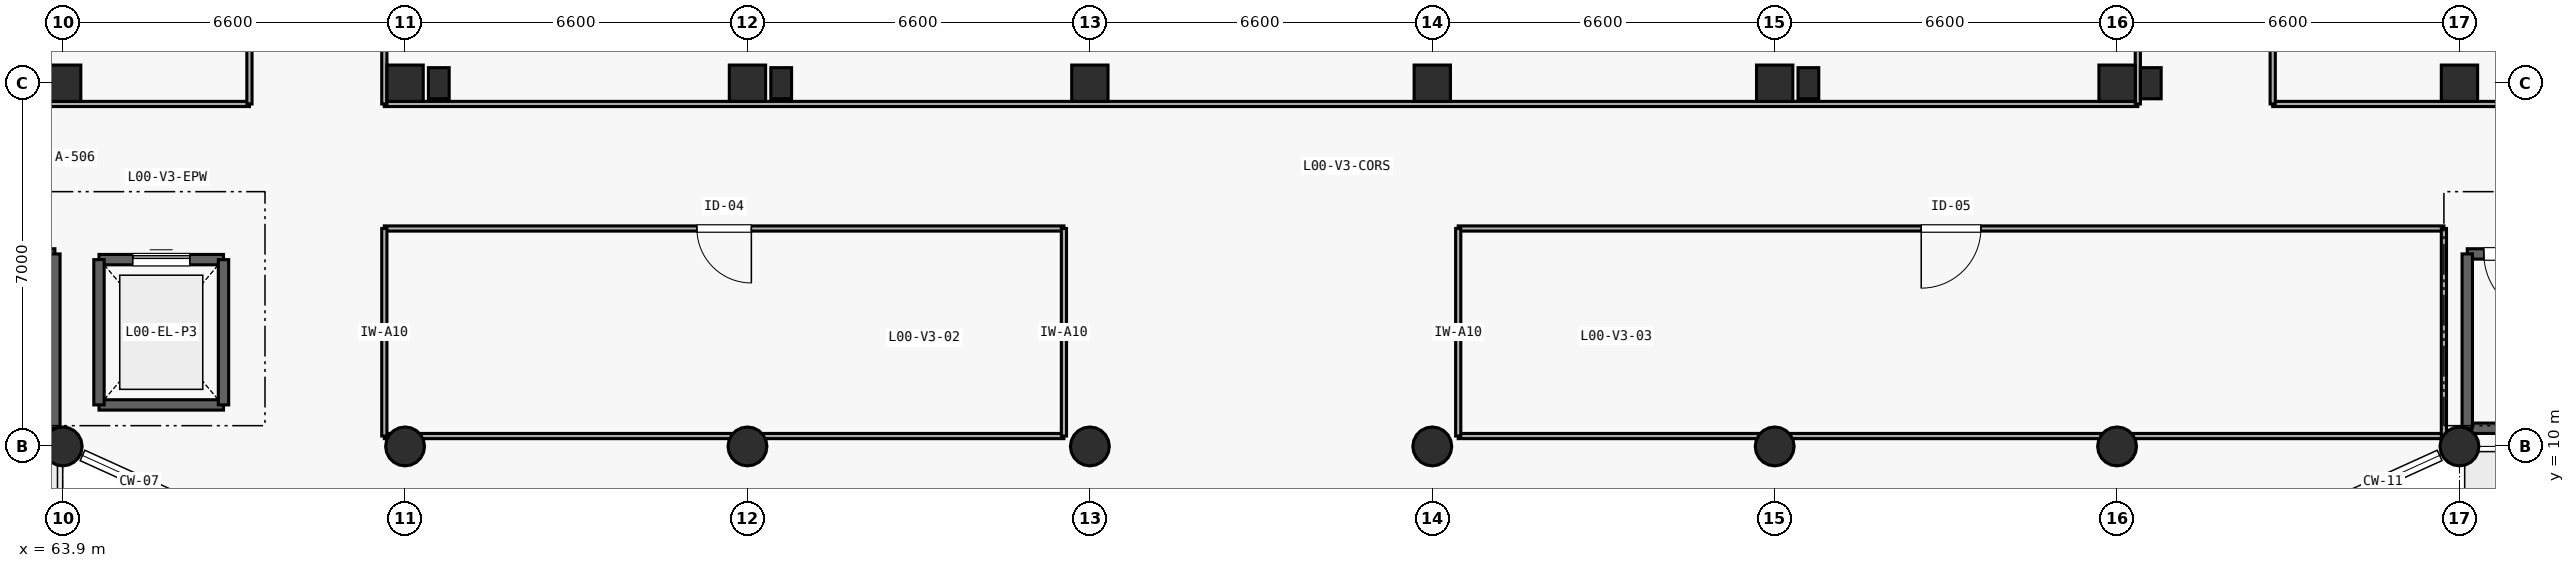
"""IFC4 building model, lengths in metres.
Left out: names, types, materials, properties, quantities, classifications, styles, units other than length and angle.
Written with IfcOpenShell. Run it as: python <this file> out.ifc"""

import sys

from ifc_helpers import new_model, si_unit, direction, frame, frame_2d, origin, origin_2d, place, context, subcontext, project, spatial, rectangle, circle, extrude, element, fill, save


model = new_model("IFC4")
c1 = context("Model", 3, precision=1e-05, world=origin(), true_north=direction((0.0, 1.0)))
c2 = subcontext(c1, "Body", "Model", "MODEL_VIEW")
j1 = project(units=[si_unit("LENGTHUNIT", "METRE"), si_unit("PLANEANGLEUNIT", "RADIAN")], contexts=[c1])
p1 = place(None, origin())
s1 = spatial("IfcSite", under=j1, at=p1, CompositionType="ELEMENT")
p2 = place(p1, origin())
s2 = spatial("IfcBuilding", under=s1, at=p2, CompositionType="ELEMENT")
p3 = place(p2, origin())
s3 = spatial("IfcBuildingStorey", under=s2, at=p3, CompositionType="ELEMENT", Elevation=0.0)
p4 = place(p3, frame((63.9, 10.0, 0.0), z_axis=(0.0, 0.0, 1.0), x_axis=(1.0, 0.0, 0.0)))
e1 = element("IfcColumn", 1, at=p4, inside=s3, PredefinedType="COLUMN", context=c2, shape_type="SweptSolid", body=[
    extrude(circle(Radius=0.375, at=origin_2d()), origin(), (0.0, 0.0, 1.0), 4.2),
])
p5 = place(p3, frame((63.9, 17.0, 0.0), z_axis=(0.0, 0.0, 1.0), x_axis=(1.0, 0.0, 0.0)))
e2 = element("IfcColumn", 2, at=p5, inside=s3, PredefinedType="COLUMN", context=c2, shape_type="SweptSolid", body=[
    extrude(rectangle(XDim=0.7, YDim=0.7, at=origin_2d()), origin(), (0.0, 0.0, 1.0), 4.2),
])
p6 = place(p3, frame((70.5, 10.0, 0.0), z_axis=(0.0, 0.0, 1.0), x_axis=(1.0, 0.0, 0.0)))
e3 = element("IfcColumn", 3, at=p6, inside=s3, PredefinedType="COLUMN", context=c2, shape_type="SweptSolid", body=[
    extrude(circle(Radius=0.375, at=origin_2d()), origin(), (0.0, 0.0, 1.0), 4.2),
])
p7 = place(p3, frame((70.5, 17.0, 0.0), z_axis=(0.0, 0.0, 1.0), x_axis=(1.0, 0.0, 0.0)))
e4 = element("IfcColumn", 4, at=p7, inside=s3, PredefinedType="COLUMN", context=c2, shape_type="SweptSolid", body=[
    extrude(rectangle(XDim=0.7, YDim=0.7, at=origin_2d()), origin(), (0.0, 0.0, 1.0), 4.2),
])
p8 = place(p3, frame((77.1, 10.0, 0.0), z_axis=(0.0, 0.0, 1.0), x_axis=(1.0, 0.0, 0.0)))
e5 = element("IfcColumn", 5, at=p8, inside=s3, PredefinedType="COLUMN", context=c2, shape_type="SweptSolid", body=[
    extrude(circle(Radius=0.375, at=origin_2d()), origin(), (0.0, 0.0, 1.0), 4.2),
])
p9 = place(p3, frame((77.1, 17.0, 0.0), z_axis=(0.0, 0.0, 1.0), x_axis=(1.0, 0.0, 0.0)))
e6 = element("IfcColumn", 6, at=p9, inside=s3, PredefinedType="COLUMN", context=c2, shape_type="SweptSolid", body=[
    extrude(rectangle(XDim=0.7, YDim=0.7, at=origin_2d()), origin(), (0.0, 0.0, 1.0), 4.2),
])
p10 = place(p3, frame((83.7, 10.0, 0.0), z_axis=(0.0, 0.0, 1.0), x_axis=(1.0, 0.0, 0.0)))
e7 = element("IfcColumn", 7, at=p10, inside=s3, PredefinedType="COLUMN", context=c2, shape_type="SweptSolid", body=[
    extrude(circle(Radius=0.375, at=origin_2d()), origin(), (0.0, 0.0, 1.0), 4.2),
])
p11 = place(p3, frame((83.7, 17.0, 0.0), z_axis=(0.0, 0.0, 1.0), x_axis=(1.0, 0.0, 0.0)))
e8 = element("IfcColumn", 8, at=p11, inside=s3, PredefinedType="COLUMN", context=c2, shape_type="SweptSolid", body=[
    extrude(rectangle(XDim=0.7, YDim=0.7, at=origin_2d()), origin(), (0.0, 0.0, 1.0), 4.2),
])
p12 = place(p3, frame((90.3, 10.0, 0.0), z_axis=(0.0, 0.0, 1.0), x_axis=(1.0, 0.0, 0.0)))
e9 = element("IfcColumn", 9, at=p12, inside=s3, PredefinedType="COLUMN", context=c2, shape_type="SweptSolid", body=[
    extrude(circle(Radius=0.375, at=origin_2d()), origin(), (0.0, 0.0, 1.0), 4.2),
])
p13 = place(p3, frame((90.3, 17.0, 0.0), z_axis=(0.0, 0.0, 1.0), x_axis=(1.0, 0.0, 0.0)))
e10 = element("IfcColumn", 10, at=p13, inside=s3, PredefinedType="COLUMN", context=c2, shape_type="SweptSolid", body=[
    extrude(rectangle(XDim=0.7, YDim=0.7, at=origin_2d()), origin(), (0.0, 0.0, 1.0), 4.2),
])
p14 = place(p3, frame((96.9, 10.0, 0.0), z_axis=(0.0, 0.0, 1.0), x_axis=(1.0, 0.0, 0.0)))
e11 = element("IfcColumn", 11, at=p14, inside=s3, PredefinedType="COLUMN", context=c2, shape_type="SweptSolid", body=[
    extrude(circle(Radius=0.375, at=origin_2d()), origin(), (0.0, 0.0, 1.0), 4.2),
])
p15 = place(p3, frame((96.9, 17.0, 0.0), z_axis=(0.0, 0.0, 1.0), x_axis=(1.0, 0.0, 0.0)))
e12 = element("IfcColumn", 12, at=p15, inside=s3, PredefinedType="COLUMN", context=c2, shape_type="SweptSolid", body=[
    extrude(rectangle(XDim=0.7, YDim=0.7, at=origin_2d()), origin(), (0.0, 0.0, 1.0), 4.2),
])
p16 = place(p3, frame((103.5, 10.0, 0.0), z_axis=(0.0, 0.0, 1.0), x_axis=(1.0, 0.0, 0.0)))
e13 = element("IfcColumn", 13, at=p16, inside=s3, PredefinedType="COLUMN", context=c2, shape_type="SweptSolid", body=[
    extrude(circle(Radius=0.375, at=origin_2d()), origin(), (0.0, 0.0, 1.0), 4.2),
])
p17 = place(p3, frame((103.5, 17.0, 0.0), z_axis=(0.0, 0.0, 1.0), x_axis=(1.0, 0.0, 0.0)))
e14 = element("IfcColumn", 14, at=p17, inside=s3, PredefinedType="COLUMN", context=c2, shape_type="SweptSolid", body=[
    extrude(rectangle(XDim=0.7, YDim=0.7, at=origin_2d()), origin(), (0.0, 0.0, 1.0), 4.2),
])
p18 = place(p3, frame((110.1, 10.0, 0.0), z_axis=(0.0, 0.0, 1.0), x_axis=(1.0, 0.0, 0.0)))
e15 = element("IfcColumn", 15, at=p18, inside=s3, PredefinedType="COLUMN", context=c2, shape_type="SweptSolid", body=[
    extrude(circle(Radius=0.375, at=origin_2d()), origin(), (0.0, 0.0, 1.0), 4.2),
])
p19 = place(p3, frame((110.1, 17.0, 0.0), z_axis=(0.0, 0.0, 1.0), x_axis=(1.0, 0.0, 0.0)))
e16 = element("IfcColumn", 16, at=p19, inside=s3, PredefinedType="COLUMN", context=c2, shape_type="SweptSolid", body=[
    extrude(rectangle(XDim=0.7, YDim=0.7, at=origin_2d()), origin(), (0.0, 0.0, 1.0), 4.2),
])
for number, where, z_axis, x_axis in (
    (17, (71.15, 17.0, 0.0), (0.0, 0.0, 1.0), (1.0, 0.0, 0.0)),
    (18, (77.75, 17.0, 0.0), (0.0, 0.0, 1.0), (1.0, 0.0, 0.0)),
    (19, (97.55, 17.0, 0.0), (0.0, 0.0, 1.0), (1.0, 0.0, 0.0)),
    (20, (104.15, 17.0, 0.0), (0.0, 0.0, 1.0), (1.0, 0.0, 0.0)),
):
    element("IfcColumn", number, at=place(p3, frame(where, z_axis=z_axis, x_axis=x_axis)), inside=s3, PredefinedType="PILASTER", context=c2, shape_type="SweptSolid", body=[
        extrude(rectangle(XDim=0.4, YDim=0.6, at=origin_2d()), origin(), (0.0, 0.0, 1.0), 4.2),
    ])
p20 = place(p3, frame((57.45, 10.35, 0.0), z_axis=(0.0, 0.0, 1.0), x_axis=(1.0, 0.0, 0.0)))
e21 = element("IfcWall", 21, at=p20, inside=s3, PredefinedType="SHEAR", context=c2, shape_type="SweptSolid", body=[
    extrude(rectangle(XDim=6.3, YDim=0.2, at=frame_2d((3.15, 0.0))), origin(), (0.0, 0.0, 1.0), 4.2),
])
p21 = place(p3, frame((57.45, 13.71, 0.0), z_axis=(0.0, 0.0, 1.0), x_axis=(1.0, 0.0, 0.0)))
e22 = element("IfcWall", 22, at=p21, inside=s3, PredefinedType="SHEAR", context=c2, shape_type="SweptSolid", body=[
    extrude(rectangle(XDim=6.3, YDim=0.2, at=frame_2d((3.15, 0.0))), origin(), (0.0, 0.0, 1.0), 4.2),
])
p22 = place(p21, frame((0.32, 0.0, 0.0)))
e23 = element("IfcOpeningElement", 23, at=p22, cuts=e22, PredefinedType="OPENING", context=c2, shape_type="SweptSolid", body=[
    extrude(rectangle(XDim=1.2, YDim=2.15, at=frame_2d((0.6, 1.075))), frame((0.0, 0.11, 0.0), z_axis=(0.0, -1.0, 0.0), x_axis=(1.0, 0.0, 0.0)), (0.0, 0.0, 1.0), 0.22),
])
p23 = place(p3, frame((63.75, 10.35, 0.0), z_axis=(0.0, 0.0, 1.0), x_axis=(0.0, 1.0, 0.0)))
e24 = element("IfcWall", 24, at=p23, inside=s3, PredefinedType="SHEAR", context=c2, shape_type="SweptSolid", body=[
    extrude(rectangle(XDim=3.36, YDim=0.2, at=frame_2d((1.68, 0.0))), origin(), (0.0, 0.0, 1.0), 4.2),
])
p24 = place(p3, frame((110.25, 10.35, 0.0), z_axis=(0.0, 0.0, 1.0), x_axis=(1.0, 0.0, 0.0)))
e25 = element("IfcWall", 25, at=p24, inside=s3, PredefinedType="SHEAR", context=c2, shape_type="SweptSolid", body=[
    extrude(rectangle(XDim=6.3, YDim=0.2, at=frame_2d((3.15, 0.0))), origin(), (0.0, 0.0, 1.0), 4.2),
])
p25 = place(p3, frame((110.25, 13.71, 0.0), z_axis=(0.0, 0.0, 1.0), x_axis=(1.0, 0.0, 0.0)))
e26 = element("IfcWall", 26, at=p25, inside=s3, PredefinedType="SHEAR", context=c2, shape_type="SweptSolid", body=[
    extrude(rectangle(XDim=6.3, YDim=0.2, at=frame_2d((3.15, 0.0))), origin(), (0.0, 0.0, 1.0), 4.2),
])
p26 = place(p25, frame((0.32, 0.0, 0.0)))
e27 = element("IfcOpeningElement", 27, at=p26, cuts=e26, PredefinedType="OPENING", context=c2, shape_type="SweptSolid", body=[
    extrude(rectangle(XDim=1.2, YDim=2.15, at=frame_2d((0.6, 1.075))), frame((0.0, 0.11, 0.0), z_axis=(0.0, -1.0, 0.0), x_axis=(1.0, 0.0, 0.0)), (0.0, 0.0, 1.0), 0.22),
])
p27 = place(p3, frame((110.25, 10.35, 0.0), z_axis=(0.0, 0.0, 1.0), x_axis=(0.0, 1.0, 0.0)))
e28 = element("IfcWall", 28, at=p27, inside=s3, PredefinedType="SHEAR", context=c2, shape_type="SweptSolid", body=[
    extrude(rectangle(XDim=3.36, YDim=0.2, at=frame_2d((1.68, 0.0))), origin(), (0.0, 0.0, 1.0), 4.2),
])
p28 = place(p3, frame((64.6, 10.8, 0.0), z_axis=(0.0, 0.0, 1.0), x_axis=(1.0, 0.0, 0.0)))
e29 = element("IfcWall", 29, at=p28, inside=s3, PredefinedType="SHEAR", context=c2, shape_type="SweptSolid", body=[
    extrude(rectangle(XDim=2.4, YDim=0.2, at=frame_2d((1.2, 0.0))), origin(), (0.0, 0.0, 1.0), 4.2),
])
p29 = place(p3, frame((64.6, 13.6, 0.0), z_axis=(0.0, 0.0, 1.0), x_axis=(1.0, 0.0, 0.0)))
e30 = element("IfcWall", 30, at=p29, inside=s3, PredefinedType="SHEAR", context=c2, shape_type="SweptSolid", body=[
    extrude(rectangle(XDim=2.4, YDim=0.2, at=frame_2d((1.2, 0.0))), origin(), (0.0, 0.0, 1.0), 4.2),
])
p30 = place(p29, frame((0.65, 0.0, 0.0)))
e31 = element("IfcOpeningElement", 31, at=p30, cuts=e30, PredefinedType="OPENING", context=c2, shape_type="SweptSolid", body=[
    extrude(rectangle(XDim=1.1, YDim=2.15, at=frame_2d((0.55, 1.075))), frame((0.0, 0.11, 0.0), z_axis=(0.0, -1.0, 0.0), x_axis=(1.0, 0.0, 0.0)), (0.0, 0.0, 1.0), 0.22),
])
for number, where, z_axis, x_axis in (
    (32, (64.6, 10.8, 0.0), (0.0, 0.0, 1.0), (0.0, 1.0, 0.0)),
    (33, (67.0, 10.8, 0.0), (0.0, 0.0, 1.0), (0.0, 1.0, 0.0)),
):
    element("IfcWall", number, at=place(p3, frame(where, z_axis=z_axis, x_axis=x_axis)), inside=s3, PredefinedType="SHEAR", context=c2, shape_type="SweptSolid", body=[
        extrude(rectangle(XDim=2.8, YDim=0.2, at=frame_2d((1.4, 0.0))), origin(), (0.0, 0.0, 1.0), 4.2),
    ])
p31 = place(p3, frame((70.1, 16.6, 0.0), z_axis=(0.0, 0.0, 1.0), x_axis=(1.0, 0.0, 0.0)))
e34 = element("IfcWall", 34, at=p31, inside=s3, PredefinedType="PARTITIONING", context=c2, shape_type="SweptSolid", body=[
    extrude(rectangle(XDim=33.8, YDim=0.1, at=frame_2d((16.9, 0.0))), origin(), (0.0, 0.0, 1.0), 3.135),
])
for number, where, z_axis, x_axis in (
    (35, (70.1, 16.6, 0.0), (0.0, 0.0, 1.0), (0.0, 1.0, 0.0)),
    (36, (103.9, 16.6, 0.0), (0.0, 0.0, 1.0), (0.0, 1.0, 0.0)),
):
    element("IfcWall", number, at=place(p3, frame(where, z_axis=z_axis, x_axis=x_axis)), inside=s3, PredefinedType="PARTITIONING", context=c2, shape_type="SweptSolid", body=[
        extrude(rectangle(XDim=8.2, YDim=0.1, at=frame_2d((4.1, 0.0))), origin(), (0.0, 0.0, 1.0), 3.9),
    ])
p32 = place(p3, frame((70.1, 10.2, 0.0), z_axis=(0.0, 0.0, 1.0), x_axis=(1.0, 0.0, 0.0)))
e37 = element("IfcWall", 37, at=p32, inside=s3, PredefinedType="PARTITIONING", context=c2, shape_type="SweptSolid", body=[
    extrude(rectangle(XDim=13.1, YDim=0.1, at=frame_2d((6.55, 0.0))), origin(), (0.0, 0.0, 1.0), 3.135),
])
p33 = place(p3, frame((70.1, 14.2, 0.0), z_axis=(0.0, 0.0, 1.0), x_axis=(1.0, 0.0, 0.0)))
e38 = element("IfcWall", 38, at=p33, inside=s3, PredefinedType="PARTITIONING", context=c2, shape_type="SweptSolid", body=[
    extrude(rectangle(XDim=13.1, YDim=0.1, at=frame_2d((6.55, 0.0))), origin(), (0.0, 0.0, 1.0), 3.9),
])
p34 = place(p33, frame((6.025, 0.0, 0.0)))
e39 = element("IfcOpeningElement", 39, at=p34, cuts=e38, PredefinedType="OPENING", context=c2, shape_type="SweptSolid", body=[
    extrude(rectangle(XDim=1.05, YDim=2.15, at=frame_2d((0.525, 1.075))), frame((0.0, 0.06, 0.0), z_axis=(0.0, -1.0, 0.0), x_axis=(1.0, 0.0, 0.0)), (0.0, 0.0, 1.0), 0.12),
])
for number, where, z_axis, x_axis in (
    (40, (70.1, 10.2, 0.0), (0.0, 0.0, 1.0), (0.0, 1.0, 0.0)),
    (41, (83.2, 10.2, 0.0), (0.0, 0.0, 1.0), (0.0, 1.0, 0.0)),
):
    element("IfcWall", number, at=place(p3, frame(where, z_axis=z_axis, x_axis=x_axis)), inside=s3, PredefinedType="PARTITIONING", context=c2, shape_type="SweptSolid", body=[
        extrude(rectangle(XDim=4.0, YDim=0.1, at=frame_2d((2.0, 0.0))), origin(), (0.0, 0.0, 1.0), 3.9),
    ])
p35 = place(p3, frame((90.8, 10.2, 0.0), z_axis=(0.0, 0.0, 1.0), x_axis=(1.0, 0.0, 0.0)))
e42 = element("IfcWall", 42, at=p35, inside=s3, PredefinedType="PARTITIONING", context=c2, shape_type="SweptSolid", body=[
    extrude(rectangle(XDim=19.0, YDim=0.1, at=frame_2d((9.5, 0.0))), origin(), (0.0, 0.0, 1.0), 3.235),
])
p36 = place(p3, frame((90.8, 14.2, 0.0), z_axis=(0.0, 0.0, 1.0), x_axis=(1.0, 0.0, 0.0)))
e43 = element("IfcWall", 43, at=p36, inside=s3, PredefinedType="PARTITIONING", context=c2, shape_type="SweptSolid", body=[
    extrude(rectangle(XDim=19.0, YDim=0.1, at=frame_2d((9.5, 0.0))), origin(), (0.0, 0.0, 1.0), 3.9),
])
p37 = place(p36, frame((8.925, 0.0, 0.0)))
e44 = element("IfcOpeningElement", 44, at=p37, cuts=e43, PredefinedType="OPENING", context=c2, shape_type="SweptSolid", body=[
    extrude(rectangle(XDim=1.15, YDim=2.15, at=frame_2d((0.575, 1.075))), frame((0.0, 0.06, 0.0), z_axis=(0.0, -1.0, 0.0), x_axis=(1.0, 0.0, 0.0)), (0.0, 0.0, 1.0), 0.12),
])
for number, where, z_axis, x_axis in (
    (45, (90.8, 10.2, 0.0), (0.0, 0.0, 1.0), (0.0, 1.0, 0.0)),
    (46, (109.8, 10.2, 0.0), (0.0, 0.0, 1.0), (0.0, 1.0, 0.0)),
):
    element("IfcWall", number, at=place(p3, frame(where, z_axis=z_axis, x_axis=x_axis)), inside=s3, PredefinedType="PARTITIONING", context=c2, shape_type="SweptSolid", body=[
        extrude(rectangle(XDim=4.0, YDim=0.1, at=frame_2d((2.0, 0.0))), origin(), (0.0, 0.0, 1.0), 3.9),
    ])
p38 = place(p3, frame((50.9, 16.6, 0.0), z_axis=(0.0, 0.0, 1.0), x_axis=(1.0, 0.0, 0.0)))
e47 = element("IfcWall", 47, at=p38, inside=s3, PredefinedType="PARTITIONING", context=c2, shape_type="SweptSolid", body=[
    extrude(rectangle(XDim=16.6, YDim=0.1, at=frame_2d((8.3, 0.0))), origin(), (0.0, 0.0, 1.0), 3.9),
])
p39 = place(p3, frame((67.5, 16.6, 0.0), z_axis=(0.0, 0.0, 1.0), x_axis=(0.0, 1.0, 0.0)))
e48 = element("IfcWall", 48, at=p39, inside=s3, PredefinedType="PARTITIONING", context=c2, shape_type="SweptSolid", body=[
    extrude(rectangle(XDim=8.2, YDim=0.1, at=frame_2d((4.1, 0.0))), origin(), (0.0, 0.0, 1.0), 3.9),
])
p40 = place(p3, frame((106.5, 16.6, 0.0), z_axis=(0.0, 0.0, 1.0), x_axis=(1.0, 0.0, 0.0)))
e49 = element("IfcWall", 49, at=p40, inside=s3, PredefinedType="PARTITIONING", context=c2, shape_type="SweptSolid", body=[
    extrude(rectangle(XDim=16.6, YDim=0.1, at=frame_2d((8.3, 0.0))), origin(), (0.0, 0.0, 1.0), 3.9),
])
p41 = place(p3, frame((106.5, 16.6, 0.0), z_axis=(0.0, 0.0, 1.0), x_axis=(0.0, 1.0, 0.0)))
e50 = element("IfcWall", 50, at=p41, inside=s3, PredefinedType="PARTITIONING", context=c2, shape_type="SweptSolid", body=[
    extrude(rectangle(XDim=8.2, YDim=0.1, at=frame_2d((4.1, 0.0))), origin(), (0.0, 0.0, 1.0), 3.9),
])
p42 = place(p26, frame((1.2, 0.0, 0.0), z_axis=(0.0, 0.0, 1.0), x_axis=(-1.0, 0.0, 0.0)))
e51 = element("IfcDoor", 51, at=p42, inside=s3, OperationType="SINGLE_SWING_LEFT", PredefinedType="DOOR", context=c2, shape_type="SweptSolid", body=[
    extrude(rectangle(XDim=1.2, YDim=2.15, at=frame_2d((0.6, 1.075))), frame((0.0, 0.025, 0.0), z_axis=(0.0, -1.0, 0.0), x_axis=(1.0, 0.0, 0.0)), (0.0, 0.0, 1.0), 0.05),
])
fill(e27, e51)
p43 = place(p30, origin())
e52 = element("IfcDoor", 52, at=p43, inside=s3, OperationType="SLIDING_TO_LEFT", PredefinedType="DOOR", context=c2, shape_type="SweptSolid", body=[
    extrude(rectangle(XDim=1.1, YDim=2.15, at=frame_2d((0.55, 1.075))), frame((0.0, 0.025, 0.0), z_axis=(0.0, -1.0, 0.0), x_axis=(1.0, 0.0, 0.0)), (0.0, 0.0, 1.0), 0.05),
])
fill(e31, e52)
p44 = place(p34, frame((1.05, 0.0, 0.0), z_axis=(0.0, 0.0, 1.0), x_axis=(-1.0, 0.0, 0.0)))
e53 = element("IfcDoor", 53, at=p44, inside=s3, OperationType="SINGLE_SWING_LEFT", PredefinedType="DOOR", context=c2, shape_type="SweptSolid", body=[
    extrude(rectangle(XDim=1.05, YDim=2.15, at=frame_2d((0.525, 1.075))), frame((0.0, 0.025, 0.0), z_axis=(0.0, -1.0, 0.0), x_axis=(1.0, 0.0, 0.0)), (0.0, 0.0, 1.0), 0.05),
])
fill(e39, e53)
p45 = place(p37, frame((1.15, 0.0, 0.0), z_axis=(0.0, 0.0, 1.0), x_axis=(-1.0, 0.0, 0.0)))
e54 = element("IfcDoor", 54, at=p45, inside=s3, OperationType="SINGLE_SWING_RIGHT", PredefinedType="DOOR", context=c2, shape_type="SweptSolid", body=[
    extrude(rectangle(XDim=1.15, YDim=2.15, at=frame_2d((0.575, 1.075))), frame((0.0, 0.025, 0.0), z_axis=(0.0, -1.0, 0.0), x_axis=(1.0, 0.0, 0.0)), (0.0, 0.0, 1.0), 0.05),
])
fill(e44, e54)
save(model, sys.argv[1])
